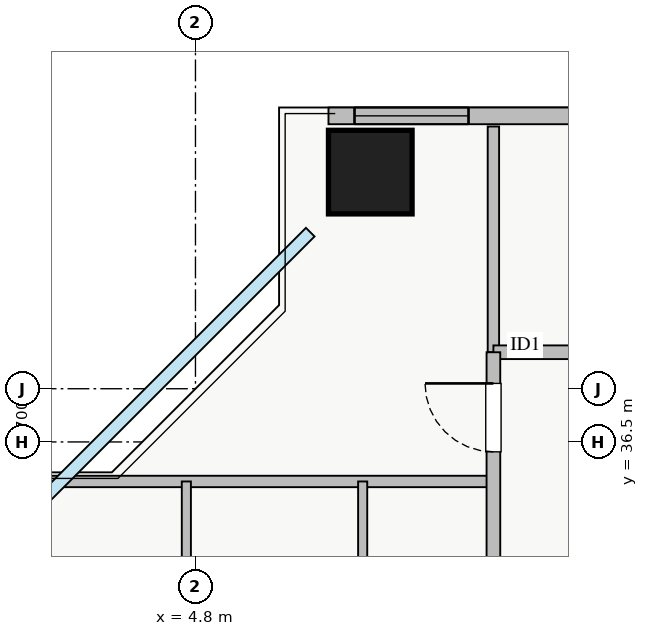
"""IFC4 building model, lengths in metres.
Left out: names, types, materials, properties, quantities, classifications, styles, units other than length and angle.
Written with IfcOpenShell. Run it as: python <this file> out.ifc"""

import sys

from ifc_helpers import new_model, si_unit, direction, frame, frame_2d, origin, origin_2d, place, context, subcontext, project, spatial, rectangle, extrude, source, transform, mapped, element, fill, save


model = new_model("IFC4")
c1 = context("Model", 3, precision=1e-05, world=origin(), true_north=direction((0.0, 1.0)))
c2 = subcontext(c1, "Body", "Model", "MODEL_VIEW")
j1 = project(units=[si_unit("LENGTHUNIT", "METRE"), si_unit("PLANEANGLEUNIT", "RADIAN")], contexts=[c1])
p1 = place(None, origin())
s1 = spatial("IfcSite", under=j1, at=p1, CompositionType="ELEMENT")
p2 = place(p1, origin())
s2 = spatial("IfcBuilding", under=s1, at=p2, CompositionType="ELEMENT")
p3 = place(p2, frame((0.0, 0.0, 123.0)))
s3 = spatial("IfcBuildingStorey", under=s2, at=p3, CompositionType="ELEMENT", Elevation=123.0)
m1 = source(origin(), c2, "Body", "SweptSolid", [
    extrude(rectangle(XDim=1.1, YDim=1.1, at=origin_2d()), origin(), (0.0, 0.0, 1.0), 3.25),
])
p4 = place(p3, frame((7.1, 40.05, 0.0), z_axis=(0.0, 0.0, 1.0), x_axis=(1.0, 0.0, 0.0)))
e1 = element("IfcColumn", 1, at=p4, inside=s3, PredefinedType="COLUMN", context=c2, shape_type="MappedRepresentation", body=[
    mapped(m1, transform((0.0, 0.0, 0.0), x_axis=(1.0, 0.0, 0.0), y_axis=(0.0, 1.0, 0.0), z_axis=(0.0, 0.0, 1.0), scale=1.0)),
])
p5 = place(p3, frame((6.55, 40.79, 0.0), z_axis=(0.0, 0.0, 1.0), x_axis=(1.0, 0.0, 0.0)))
e2 = element("IfcWall", 2, at=p5, inside=s3, PredefinedType="STANDARD", context=c2, shape_type="SweptSolid", body=[
    extrude(rectangle(XDim=24.9, YDim=0.22, at=frame_2d((12.45, 0.0))), origin(), (0.0, 0.0, 1.0), 2.61),
])
p6 = place(p5, frame((13.3, 0.0, 0.0)))
e3 = element("IfcOpeningElement", 3, at=p6, cuts=e2, PredefinedType="OPENING", context=c2, shape_type="SweptSolid", body=[
    extrude(rectangle(XDim=1.2, YDim=2.1, at=frame_2d((0.6, 1.05))), frame((0.0, 0.12, 0.0), z_axis=(0.0, -1.0, 0.0), x_axis=(1.0, 0.0, 0.0)), (0.0, 0.0, 1.0), 0.24),
])
p7 = place(p5, frame((0.343, 0.0, 0.9)))
e4 = element("IfcOpeningElement", 4, at=p7, cuts=e2, PredefinedType="OPENING", context=c2, shape_type="SweptSolid", body=[
    extrude(rectangle(XDim=1.5, YDim=1.5, at=frame_2d((0.75, 0.75))), frame((0.0, 0.12, 0.0), z_axis=(0.0, -1.0, 0.0), x_axis=(1.0, 0.0, 0.0)), (0.0, 0.0, 1.0), 0.24),
])
p8 = place(p5, frame((8.438, 0.0, 0.9)))
e5 = element("IfcOpeningElement", 5, at=p8, cuts=e2, PredefinedType="OPENING", context=c2, shape_type="SweptSolid", body=[
    extrude(rectangle(XDim=1.8, YDim=1.45, at=frame_2d((0.9, 0.725))), frame((0.0, 0.12, 0.0), z_axis=(0.0, -1.0, 0.0), x_axis=(1.0, 0.0, 0.0)), (0.0, 0.0, 1.0), 0.24),
])
p9 = place(p5, frame((17.261, 0.0, 0.9)))
e6 = element("IfcOpeningElement", 6, at=p9, cuts=e2, PredefinedType="OPENING", context=c2, shape_type="SweptSolid", body=[
    extrude(rectangle(XDim=1.5, YDim=1.5, at=frame_2d((0.75, 0.75))), frame((0.0, 0.12, 0.0), z_axis=(0.0, -1.0, 0.0), x_axis=(1.0, 0.0, 0.0)), (0.0, 0.0, 1.0), 0.24),
])
p10 = place(p5, frame((20.738, 0.0, 0.9)))
e7 = element("IfcOpeningElement", 7, at=p10, cuts=e2, PredefinedType="OPENING", context=c2, shape_type="SweptSolid", body=[
    extrude(rectangle(XDim=2.1, YDim=1.48, at=frame_2d((1.05, 0.74))), frame((0.0, 0.12, 0.0), z_axis=(0.0, -1.0, 0.0), x_axis=(1.0, 0.0, 0.0)), (0.0, 0.0, 1.0), 0.24),
])
p11 = place(p5, frame((4.122, 0.0, 0.9)))
e8 = element("IfcOpeningElement", 8, at=p11, cuts=e2, PredefinedType="OPENING", context=c2, shape_type="SweptSolid", body=[
    extrude(rectangle(XDim=2.4, YDim=1.5, at=frame_2d((1.2, 0.75))), frame((0.0, 0.12, 0.0), z_axis=(0.0, -1.0, 0.0), x_axis=(1.0, 0.0, 0.0)), (0.0, 0.0, 1.0), 0.24),
])
p12 = place(p3, frame((8.72, 37.68, 0.0), z_axis=(0.0, 0.0, 1.0), x_axis=(0.0, 1.0, 0.0)))
e9 = element("IfcWall", 9, at=p12, inside=s3, PredefinedType="PARTITIONING", context=c2, shape_type="SweptSolid", body=[
    extrude(rectangle(XDim=2.97, YDim=0.15, at=frame_2d((1.485, 0.0))), origin(), (0.0, 0.0, 1.0), 3.07),
])
p13 = place(p3, frame((8.72, 37.68, 0.0), z_axis=(0.0, 0.0, 1.0), x_axis=(1.0, 0.0, 0.0)))
e10 = element("IfcWall", 10, at=p13, inside=s3, PredefinedType="PARTITIONING", context=c2, shape_type="SweptSolid", body=[
    extrude(rectangle(XDim=23.63, YDim=0.18, at=frame_2d((11.815, 0.0))), origin(), (0.0, 0.0, 1.0), 3.07),
])
p14 = place(p13, frame((6.04, 0.0, 0.0)))
e11 = element("IfcOpeningElement", 11, at=p14, cuts=e10, PredefinedType="OPENING", context=c2, shape_type="SweptSolid", body=[
    extrude(rectangle(XDim=1.0, YDim=2.05, at=frame_2d((0.5, 1.025))), frame((0.0, 0.1, 0.0), z_axis=(0.0, -1.0, 0.0), x_axis=(1.0, 0.0, 0.0)), (0.0, 0.0, 1.0), 0.2),
])
p15 = place(p13, frame((17.67, 0.0, 0.0)))
e12 = element("IfcOpeningElement", 12, at=p15, cuts=e10, PredefinedType="OPENING", context=c2, shape_type="SweptSolid", body=[
    extrude(rectangle(XDim=1.0, YDim=2.05, at=frame_2d((0.5, 1.025))), frame((0.0, 0.1, 0.0), z_axis=(0.0, -1.0, 0.0), x_axis=(1.0, 0.0, 0.0)), (0.0, 0.0, 1.0), 0.2),
])
p16 = place(p3, frame((1.35, 35.98, 0.0), z_axis=(0.0, 0.0, 1.0), x_axis=(1.0, 0.0, 0.0)))
e13 = element("IfcWall", 13, at=p16, inside=s3, PredefinedType="PARTITIONING", context=c2, shape_type="SweptSolid", body=[
    extrude(rectangle(XDim=7.37, YDim=0.15, at=frame_2d((3.685, 0.0))), origin(), (0.0, 0.0, 1.0), 3.07),
])
p17 = place(p3, frame((4.68, 31.42, 0.0), z_axis=(0.0, 0.0, 1.0), x_axis=(0.0, 1.0, 0.0)))
e14 = element("IfcWall", 14, at=p17, inside=s3, PredefinedType="PLUMBINGWALL", context=c2, shape_type="SweptSolid", body=[
    extrude(rectangle(XDim=4.56, YDim=0.12, at=frame_2d((2.28, 0.0))), origin(), (0.0, 0.0, 1.0), 3.07),
])
p18 = place(p3, frame((7.0, 31.42, 0.0), z_axis=(0.0, 0.0, 1.0), x_axis=(0.0, 1.0, 0.0)))
e15 = element("IfcWall", 15, at=p18, inside=s3, PredefinedType="PLUMBINGWALL", context=c2, shape_type="SweptSolid", body=[
    extrude(rectangle(XDim=4.56, YDim=0.12, at=frame_2d((2.28, 0.0))), origin(), (0.0, 0.0, 1.0), 2.577),
])
p19 = place(p3, frame((8.72, 8.31, 0.0), z_axis=(0.0, 0.0, 1.0), x_axis=(0.0, 1.0, 0.0)))
e16 = element("IfcWall", 16, at=p19, inside=s3, PredefinedType="PARTITIONING", context=c2, shape_type="SweptSolid", body=[
    extrude(rectangle(XDim=29.37, YDim=0.18, at=frame_2d((14.685, 0.0))), origin(), (0.0, 0.0, 1.0), 3.07),
])
p20 = place(p19, frame((28.06, 0.0, 0.0)))
e17 = element("IfcOpeningElement", 17, at=p20, cuts=e16, PredefinedType="OPENING", context=c2, shape_type="SweptSolid", body=[
    extrude(rectangle(XDim=0.9, YDim=2.05, at=frame_2d((0.45, 1.025))), frame((0.0, 0.1, 0.0), z_axis=(0.0, -1.0, 0.0), x_axis=(1.0, 0.0, 0.0)), (0.0, 0.0, 1.0), 0.2),
])
p21 = place(p19, frame((0.24, 0.0, 0.0)))
e18 = element("IfcOpeningElement", 18, at=p21, cuts=e16, PredefinedType="OPENING", context=c2, shape_type="SweptSolid", body=[
    extrude(rectangle(XDim=0.9, YDim=2.05, at=frame_2d((0.45, 1.025))), frame((0.0, 0.1, 0.0), z_axis=(0.0, -1.0, 0.0), x_axis=(1.0, 0.0, 0.0)), (0.0, 0.0, 1.0), 0.2),
])
p22 = place(p19, frame((2.92, 0.0, 0.0)))
e19 = element("IfcOpeningElement", 19, at=p22, cuts=e16, PredefinedType="OPENING", context=c2, shape_type="SweptSolid", body=[
    extrude(rectangle(XDim=1.0, YDim=2.05, at=frame_2d((0.5, 1.025))), frame((0.0, 0.1, 0.0), z_axis=(0.0, -1.0, 0.0), x_axis=(1.0, 0.0, 0.0)), (0.0, 0.0, 1.0), 0.2),
])
p23 = place(p19, frame((14.315, 0.0, 0.0)))
e20 = element("IfcOpeningElement", 20, at=p23, cuts=e16, PredefinedType="OPENING", context=c2, shape_type="SweptSolid", body=[
    extrude(rectangle(XDim=1.0, YDim=2.05, at=frame_2d((0.5, 1.025))), frame((0.0, 0.1, 0.0), z_axis=(0.0, -1.0, 0.0), x_axis=(1.0, 0.0, 0.0)), (0.0, 0.0, 1.0), 0.2),
])
p24 = place(p19, frame((20.315, 0.0, 0.0)))
e21 = element("IfcOpeningElement", 21, at=p24, cuts=e16, PredefinedType="OPENING", context=c2, shape_type="SweptSolid", body=[
    extrude(rectangle(XDim=1.0, YDim=2.05, at=frame_2d((0.5, 1.025))), frame((0.0, 0.1, 0.0), z_axis=(0.0, -1.0, 0.0), x_axis=(1.0, 0.0, 0.0)), (0.0, 0.0, 1.0), 0.2),
])
m2 = source(origin(), c2, "Body", "SweptSolid", [
    extrude(rectangle(XDim=1.5, YDim=1.5, at=frame_2d((0.75, 0.75))), frame((0.0, 0.03, 0.0), z_axis=(0.0, -1.0, 0.0), x_axis=(1.0, 0.0, 0.0)), (0.0, 0.0, 1.0), 0.06),
])
p25 = place(p7, origin())
e22 = element("IfcWindow", 22, at=p25, inside=s3, PartitioningType="TRIPLE_PANEL_VERTICAL", PredefinedType="WINDOW", context=c2, shape_type="MappedRepresentation", body=[
    mapped(m2, transform((0.0, 0.0, 0.0), x_axis=(1.0, 0.0, 0.0), y_axis=(0.0, 1.0, 0.0), z_axis=(0.0, 0.0, 1.0), scale=1.0)),
])
fill(e4, e22)
m3 = source(origin(), c2, "Body", "SweptSolid", [
    extrude(rectangle(XDim=0.9, YDim=2.05, at=frame_2d((0.45, 1.025))), frame((0.0, 0.025, 0.0), z_axis=(0.0, -1.0, 0.0), x_axis=(1.0, 0.0, 0.0)), (0.0, 0.0, 1.0), 0.05),
])
p26 = place(p20, origin())
e23 = element("IfcDoor", 23, at=p26, inside=s3, OperationType="SINGLE_SWING_RIGHT", PredefinedType="DOOR", context=c2, shape_type="MappedRepresentation", body=[
    mapped(m3, transform((0.0, 0.0, 0.0), x_axis=(1.0, 0.0, 0.0), y_axis=(0.0, 1.0, 0.0), z_axis=(0.0, 0.0, 1.0), scale=1.0)),
])
fill(e17, e23)
save(model, sys.argv[1])
